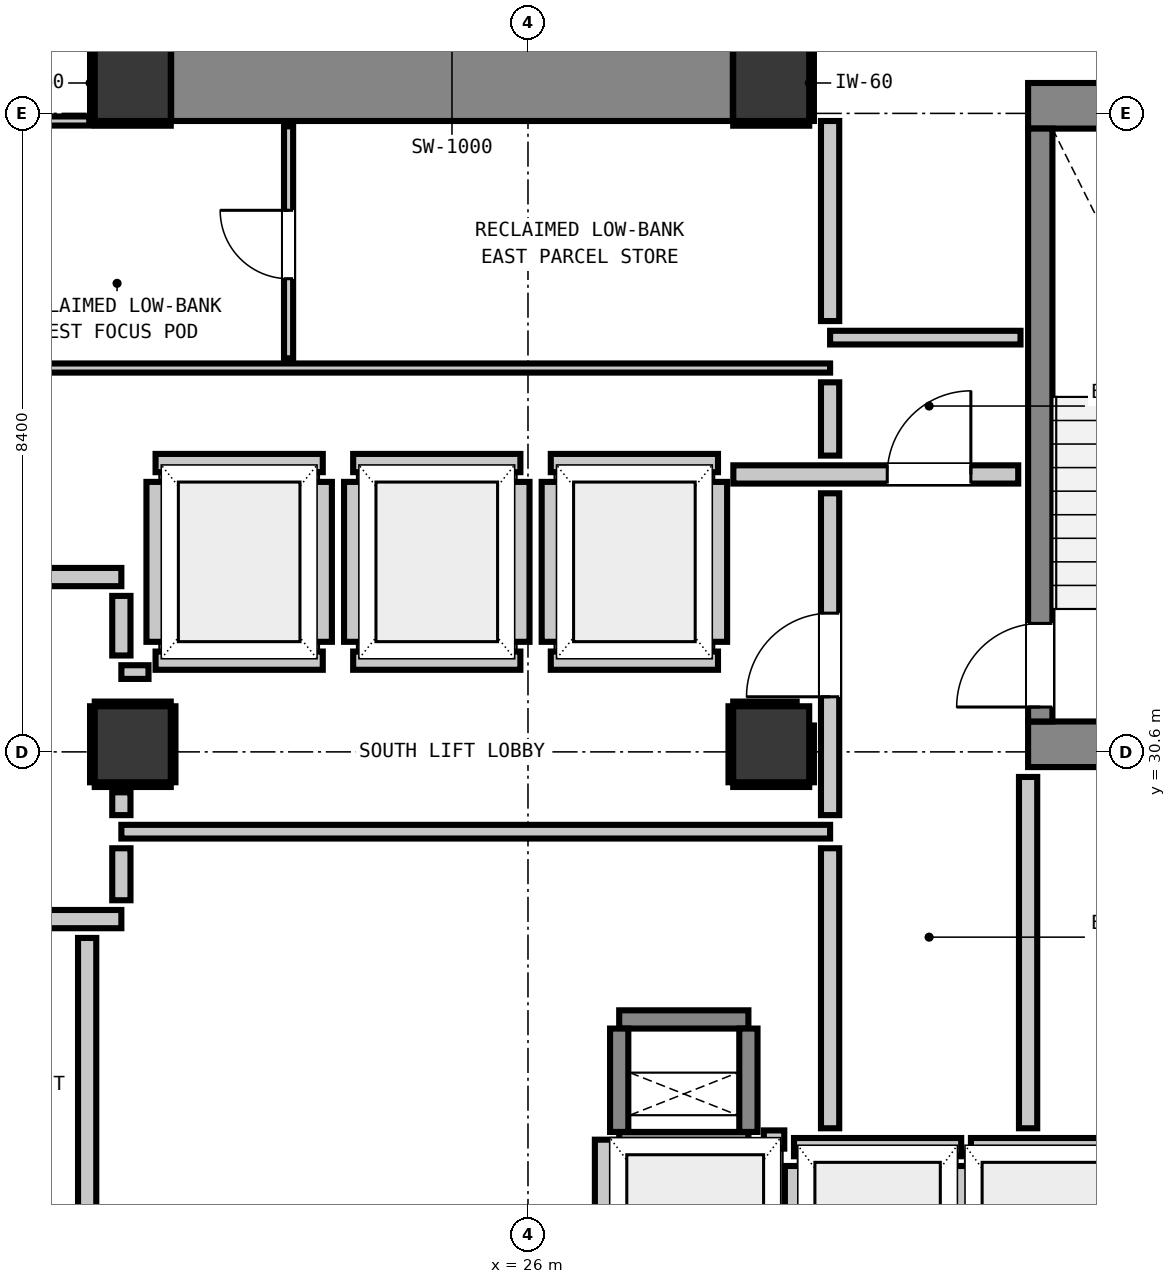
"""IFC4 building model, lengths in metres.
Left out: names, types, materials, properties, quantities, classifications, styles, units other than length and angle.
Written with IfcOpenShell. Run it as: python <this file> out.ifc"""

import sys

from ifc_helpers import new_model, si_unit, direction, frame, frame_2d, origin, origin_2d, place, context, subcontext, project, spatial, rectangle, extrude, element, fill, save


model = new_model("IFC4")
c1 = context("Model", 3, precision=1e-05, world=origin(), true_north=direction((0.0, 1.0)))
c2 = subcontext(c1, "Body", "Model", "MODEL_VIEW")
j1 = project(units=[si_unit("LENGTHUNIT", "METRE"), si_unit("PLANEANGLEUNIT", "RADIAN")], contexts=[c1])
p1 = place(None, origin())
s1 = spatial("IfcSite", under=j1, at=p1, CompositionType="ELEMENT")
p2 = place(p1, origin())
s2 = spatial("IfcBuilding", under=s1, at=p2, CompositionType="ELEMENT")
p3 = place(p2, frame((0.0, 0.0, 99.44)))
s3 = spatial("IfcBuildingStorey", under=s2, at=p3, CompositionType="ELEMENT", Elevation=99.44)
for number, where, z_axis, x_axis in (
    (1, (20.8, 39.4, 0.0), (0.0, 0.0, 1.0), (1.0, 0.0, 0.0)),
    (2, (29.2, 39.4, 0.0), (0.0, 0.0, 1.0), (1.0, 0.0, 0.0)),
):
    element("IfcColumn", number, at=place(p3, frame(where, z_axis=z_axis, x_axis=x_axis)), inside=s3, PredefinedType="COLUMN", context=c2, shape_type="SweptSolid", body=[
        extrude(rectangle(XDim=1.0, YDim=1.0, at=origin_2d()), origin(), (0.0, 0.0, 1.0), 3.32),
    ])
p4 = place(p3, frame((32.58, 39.1, 0.0), z_axis=(0.0, 0.0, 1.0), x_axis=(1.0, 0.0, 0.0)))
e3 = element("IfcWall", 3, at=p4, inside=s3, PredefinedType="SHEAR", context=c2, shape_type="SweptSolid", body=[
    extrude(rectangle(XDim=4.08, YDim=0.6, at=frame_2d((2.04, 0.0))), origin(), (0.0, 0.0, 1.0), 3.32),
])
p5 = place(p3, frame((32.58, 30.7, 0.0), z_axis=(0.0, 0.0, 1.0), x_axis=(1.0, 0.0, 0.0)))
e4 = element("IfcWall", 4, at=p5, inside=s3, PredefinedType="SHEAR", context=c2, shape_type="SweptSolid", body=[
    extrude(rectangle(XDim=3.415, YDim=0.6, at=frame_2d((1.708, 0.0))), origin(), (0.0, 0.0, 1.0), 3.32),
])
p6 = place(p3, frame((21.305, 39.4, 0.0), z_axis=(0.0, 0.0, 1.0), x_axis=(1.0, 0.0, 0.0)))
e5 = element("IfcWall", 5, at=p6, inside=s3, PredefinedType="SHEAR", context=c2, shape_type="SweptSolid", body=[
    extrude(rectangle(XDim=7.39, YDim=1.0, at=frame_2d((3.695, 0.0))), origin(), (0.0, 0.0, 1.0), 3.32),
])
p7 = place(p3, frame((32.74, 31.0, 0.0), z_axis=(0.0, 0.0, 1.0), x_axis=(0.0, 1.0, 0.0)))
e6 = element("IfcWall", 6, at=p7, inside=s3, PredefinedType="SHEAR", context=c2, shape_type="SweptSolid", body=[
    extrude(rectangle(XDim=7.8, YDim=0.32, at=frame_2d((3.9, 0.0))), origin(), (0.0, 0.0, 1.0), 3.32),
])
p8 = place(p7, frame((0.19, 0.0, 0.0)))
e7 = element("IfcOpeningElement", 7, at=p8, cuts=e6, PredefinedType="OPENING", context=c2, shape_type="SweptSolid", body=[
    extrude(rectangle(XDim=1.1, YDim=2.15, at=frame_2d((0.55, 1.075))), frame((0.0, 0.17, 0.0), z_axis=(0.0, -1.0, 0.0), x_axis=(1.0, 0.0, 0.0)), (0.0, 0.0, 1.0), 0.34),
])
for number, where, z_axis, x_axis in (
    (8, (27.2, 25.48, 0.0), (0.0, 0.0, 1.0), (1.0, 0.0, 0.0)),
    (9, (27.2, 27.08, 0.0), (0.0, 0.0, 1.0), (1.0, 0.0, 0.0)),
):
    element("IfcWall", number, at=place(p3, frame(where, z_axis=z_axis, x_axis=x_axis)), inside=s3, PredefinedType="SHEAR", context=c2, shape_type="SweptSolid", body=[
        extrude(rectangle(XDim=1.7, YDim=0.24, at=frame_2d((0.85, 0.0))), origin(), (0.0, 0.0, 1.0), 3.32),
    ])
for number, where, z_axis, x_axis in (
    (10, (27.2, 25.6, 0.0), (0.0, 0.0, 1.0), (0.0, 1.0, 0.0)),
    (11, (28.9, 25.6, 0.0), (0.0, 0.0, 1.0), (0.0, 1.0, 0.0)),
):
    element("IfcWall", number, at=place(p3, frame(where, z_axis=z_axis, x_axis=x_axis)), inside=s3, PredefinedType="SHEAR", context=c2, shape_type="SweptSolid", body=[
        extrude(rectangle(XDim=1.36, YDim=0.24, at=frame_2d((0.68, 0.0))), origin(), (0.0, 0.0, 1.0), 3.32),
    ])
for number, where, z_axis, x_axis in (
    (12, (20.8, 30.7, 0.0), (0.0, 0.0, 1.0), (1.0, 0.0, 0.0)),
    (13, (29.2, 30.7, 0.0), (0.0, 0.0, 1.0), (1.0, 0.0, 0.0)),
):
    element("IfcColumn", number, at=place(p3, frame(where, z_axis=z_axis, x_axis=x_axis)), inside=s3, PredefinedType="COLUMN", context=c2, shape_type="SweptSolid", body=[
        extrude(rectangle(XDim=1.0, YDim=1.0, at=origin_2d()), origin(), (0.0, 0.0, 1.0), 3.32),
    ])
for number, where, z_axis, x_axis in (
    (14, (21.1, 31.8, 0.0), (0.0, 0.0, 1.0), (1.0, 0.0, 0.0)),
    (15, (21.1, 34.4, 0.0), (0.0, 0.0, 1.0), (1.0, 0.0, 0.0)),
):
    element("IfcWall", number, at=place(p3, frame(where, z_axis=z_axis, x_axis=x_axis)), inside=s3, PredefinedType="PARTITIONING", context=c2, shape_type="SweptSolid", body=[
        extrude(rectangle(XDim=2.2, YDim=0.24, at=frame_2d((1.1, 0.0))), origin(), (0.0, 0.0, 1.0), 3.06),
    ])
p9 = place(p3, frame((21.1, 32.048, 0.0), z_axis=(0.0, 0.0, 1.0), x_axis=(0.0, 1.0, 0.0)))
e16 = element("IfcWall", 16, at=p9, inside=s3, PredefinedType="PARTITIONING", context=c2, shape_type="SweptSolid", body=[
    extrude(rectangle(XDim=2.104, YDim=0.24, at=frame_2d((1.052, 0.0))), origin(), (0.0, 0.0, 1.0), 2.295),
])
p10 = place(p3, frame((23.3, 32.048, 0.0), z_axis=(0.0, 0.0, 1.0), x_axis=(0.0, 1.0, 0.0)))
e17 = element("IfcWall", 17, at=p10, inside=s3, PredefinedType="PARTITIONING", context=c2, shape_type="SweptSolid", body=[
    extrude(rectangle(XDim=2.104, YDim=0.24, at=frame_2d((1.052, 0.0))), origin(), (0.0, 0.0, 1.0), 3.06),
])
for number, where, z_axis, x_axis in (
    (18, (23.7, 31.8, 0.0), (0.0, 0.0, 1.0), (1.0, 0.0, 0.0)),
    (19, (23.7, 34.4, 0.0), (0.0, 0.0, 1.0), (1.0, 0.0, 0.0)),
):
    element("IfcWall", number, at=place(p3, frame(where, z_axis=z_axis, x_axis=x_axis)), inside=s3, PredefinedType="PARTITIONING", context=c2, shape_type="SweptSolid", body=[
        extrude(rectangle(XDim=2.2, YDim=0.24, at=frame_2d((1.1, 0.0))), origin(), (0.0, 0.0, 1.0), 3.06),
    ])
for number, where, z_axis, x_axis in (
    (20, (23.7, 32.048, 0.0), (0.0, 0.0, 1.0), (0.0, 1.0, 0.0)),
    (21, (25.9, 32.048, 0.0), (0.0, 0.0, 1.0), (0.0, 1.0, 0.0)),
):
    element("IfcWall", number, at=place(p3, frame(where, z_axis=z_axis, x_axis=x_axis)), inside=s3, PredefinedType="PARTITIONING", context=c2, shape_type="SweptSolid", body=[
        extrude(rectangle(XDim=2.104, YDim=0.24, at=frame_2d((1.052, 0.0))), origin(), (0.0, 0.0, 1.0), 3.06),
    ])
for number, where, z_axis, x_axis in (
    (22, (26.3, 31.8, 0.0), (0.0, 0.0, 1.0), (1.0, 0.0, 0.0)),
    (23, (26.3, 34.4, 0.0), (0.0, 0.0, 1.0), (1.0, 0.0, 0.0)),
):
    element("IfcWall", number, at=place(p3, frame(where, z_axis=z_axis, x_axis=x_axis)), inside=s3, PredefinedType="PARTITIONING", context=c2, shape_type="SweptSolid", body=[
        extrude(rectangle(XDim=2.2, YDim=0.24, at=frame_2d((1.1, 0.0))), origin(), (0.0, 0.0, 1.0), 3.06),
    ])
for number, where, z_axis, x_axis in (
    (24, (26.3, 32.048, 0.0), (0.0, 0.0, 1.0), (0.0, 1.0, 0.0)),
    (25, (28.5, 32.048, 0.0), (0.0, 0.0, 1.0), (0.0, 1.0, 0.0)),
):
    element("IfcWall", number, at=place(p3, frame(where, z_axis=z_axis, x_axis=x_axis)), inside=s3, PredefinedType="PARTITIONING", context=c2, shape_type="SweptSolid", body=[
        extrude(rectangle(XDim=2.104, YDim=0.24, at=frame_2d((1.052, 0.0))), origin(), (0.0, 0.0, 1.0), 3.06),
    ])
p11 = place(p3, frame((29.5, 25.4, 0.0), z_axis=(0.0, 0.0, 1.0), x_axis=(1.0, 0.0, 0.0)))
e26 = element("IfcWall", 26, at=p11, inside=s3, PredefinedType="PARTITIONING", context=c2, shape_type="SweptSolid", body=[
    extrude(rectangle(XDim=2.2, YDim=0.24, at=frame_2d((1.1, 0.0))), origin(), (0.0, 0.0, 1.0), 3.06),
])
p12 = place(p3, frame((29.5, 22.632, 0.0), z_axis=(0.0, 0.0, 1.0), x_axis=(0.0, 1.0, 0.0)))
e27 = element("IfcWall", 27, at=p12, inside=s3, PredefinedType="PARTITIONING", context=c2, shape_type="SweptSolid", body=[
    extrude(rectangle(XDim=2.52, YDim=0.24, at=frame_2d((1.26, 0.0))), origin(), (0.0, 0.0, 1.0), 2.295),
])
p13 = place(p3, frame((31.7, 22.63, 0.0), z_axis=(0.0, 0.0, 1.0), x_axis=(0.0, 1.0, 0.0)))
e28 = element("IfcWall", 28, at=p13, inside=s3, PredefinedType="PARTITIONING", context=c2, shape_type="SweptSolid", body=[
    extrude(rectangle(XDim=2.522, YDim=0.24, at=frame_2d((1.261, 0.0))), origin(), (0.0, 0.0, 1.0), 3.06),
])
p14 = place(p3, frame((31.828, 25.4, 0.0), z_axis=(0.0, 0.0, 1.0), x_axis=(1.0, 0.0, 0.0)))
e29 = element("IfcWall", 29, at=p14, inside=s3, PredefinedType="PARTITIONING", context=c2, shape_type="SweptSolid", body=[
    extrude(rectangle(XDim=2.072, YDim=0.24, at=frame_2d((1.036, 0.0))), origin(), (0.0, 0.0, 1.0), 3.06),
])
p15 = place(p3, frame((29.103, 25.5, 0.0), z_axis=(0.0, 0.0, 1.0), x_axis=(1.0, 0.0, 0.0)))
e30 = element("IfcWall", 30, at=p15, inside=s3, PredefinedType="PARTITIONING", context=c2, shape_type="SweptSolid", body=[
    extrude(rectangle(XDim=0.269, YDim=0.24, at=frame_2d((0.135, 0.0))), origin(), (0.0, 0.0, 1.0), 3.06),
])
p16 = place(p3, frame((27.0, 22.63, 0.0), z_axis=(0.0, 0.0, 1.0), x_axis=(0.0, 1.0, 0.0)))
e31 = element("IfcWall", 31, at=p16, inside=s3, PredefinedType="PARTITIONING", context=c2, shape_type="SweptSolid", body=[
    extrude(rectangle(XDim=2.868, YDim=0.24, at=frame_2d((1.434, 0.0))), origin(), (0.0, 0.0, 1.0), 3.06),
])
p17 = place(p3, frame((17.45, 28.4, 0.0), z_axis=(0.0, 0.0, 1.0), x_axis=(1.0, 0.0, 0.0)))
e32 = element("IfcWall", 32, at=p17, inside=s3, PredefinedType="PARTITIONING", context=c2, shape_type="SweptSolid", body=[
    extrude(rectangle(XDim=3.2, YDim=0.24, at=frame_2d((1.6, 0.0))), origin(), (0.0, 0.0, 1.0), 3.06),
])
p18 = place(p17, frame((0.784, 0.0, 0.0)))
e33 = element("IfcOpeningElement", 33, at=p18, cuts=e32, PredefinedType="OPENING", context=c2, shape_type="SweptSolid", body=[
    extrude(rectangle(XDim=1.1, YDim=2.15, at=frame_2d((0.55, 1.075))), frame((0.0, 0.13, 0.0), z_axis=(0.0, -1.0, 0.0), x_axis=(1.0, 0.0, 0.0)), (0.0, 0.0, 1.0), 0.26),
])
p19 = place(p3, frame((17.45, 32.9, 0.0), z_axis=(0.0, 0.0, 1.0), x_axis=(1.0, 0.0, 0.0)))
e34 = element("IfcWall", 34, at=p19, inside=s3, PredefinedType="PARTITIONING", context=c2, shape_type="SweptSolid", body=[
    extrude(rectangle(XDim=3.2, YDim=0.24, at=frame_2d((1.6, 0.0))), origin(), (0.0, 0.0, 1.0), 3.06),
])
p20 = place(p19, frame((0.159, 0.0, 0.0)))
e35 = element("IfcOpeningElement", 35, at=p20, cuts=e34, PredefinedType="OPENING", context=c2, shape_type="SweptSolid", body=[
    extrude(rectangle(XDim=1.1, YDim=2.15, at=frame_2d((0.55, 1.075))), frame((0.0, 0.13, 0.0), z_axis=(0.0, -1.0, 0.0), x_axis=(1.0, 0.0, 0.0)), (0.0, 0.0, 1.0), 0.26),
])
p21 = place(p3, frame((28.702, 34.25, 0.0), z_axis=(0.0, 0.0, 1.0), x_axis=(1.0, 0.0, 0.0)))
e36 = element("IfcWall", 36, at=p21, inside=s3, PredefinedType="PARTITIONING", context=c2, shape_type="SweptSolid", body=[
    extrude(rectangle(XDim=3.748, YDim=0.24, at=frame_2d((1.874, 0.0))), origin(), (0.0, 0.0, 1.0), 3.06),
])
p22 = place(p21, frame((2.025, 0.0, 0.0)))
e37 = element("IfcOpeningElement", 37, at=p22, cuts=e36, PredefinedType="OPENING", context=c2, shape_type="SweptSolid", body=[
    extrude(rectangle(XDim=1.1, YDim=2.15, at=frame_2d((0.55, 1.075))), frame((0.0, 0.13, 0.0), z_axis=(0.0, -1.0, 0.0), x_axis=(1.0, 0.0, 0.0)), (0.0, 0.0, 1.0), 0.26),
])
p23 = place(p3, frame((20.65, 29.55, 0.0), z_axis=(0.0, 0.0, 1.0), x_axis=(1.0, 0.0, 0.0)))
e38 = element("IfcWall", 38, at=p23, inside=s3, PredefinedType="PARTITIONING", context=c2, shape_type="SweptSolid", body=[
    extrude(rectangle(XDim=9.325, YDim=0.18, at=frame_2d((4.663, 0.0))), origin(), (0.0, 0.0, 1.0), 3.06),
])
p24 = place(p3, frame((20.65, 31.65, 0.0), z_axis=(0.0, 0.0, 1.0), x_axis=(1.0, 0.0, 0.0)))
e39 = element("IfcWall", 39, at=p24, inside=s3, PredefinedType="PARTITIONING", context=c2, shape_type="SweptSolid", body=[
    extrude(rectangle(XDim=0.357, YDim=0.18, at=frame_2d((0.179, 0.0))), origin(), (0.0, 0.0, 1.0), 3.06),
])
p25 = place(p3, frame((29.975, 36.05, 0.0), z_axis=(0.0, 0.0, 1.0), x_axis=(1.0, 0.0, 0.0)))
e40 = element("IfcWall", 40, at=p25, inside=s3, PredefinedType="PARTITIONING", context=c2, shape_type="SweptSolid", body=[
    extrude(rectangle(XDim=2.505, YDim=0.18, at=frame_2d((1.252, 0.0))), origin(), (0.0, 0.0, 1.0), 3.06),
])
p26 = place(p3, frame((18.95, 35.65, 0.0), z_axis=(0.0, 0.0, 1.0), x_axis=(1.0, 0.0, 0.0)))
e41 = element("IfcWall", 41, at=p26, inside=s3, PredefinedType="PARTITIONING", context=c2, shape_type="SweptSolid", body=[
    extrude(rectangle(XDim=11.025, YDim=0.12, at=frame_2d((5.513, 0.0))), origin(), (0.0, 0.0, 1.0), 3.06),
])
p27 = place(p3, frame((18.95, 38.9, 0.0), z_axis=(0.0, 0.0, 1.0), x_axis=(1.0, 0.0, 0.0)))
e42 = element("IfcWall", 42, at=p27, inside=s3, PredefinedType="PARTITIONING", context=c2, shape_type="SweptSolid", body=[
    extrude(rectangle(XDim=1.278, YDim=0.12, at=frame_2d((0.639, 0.0))), origin(), (0.0, 0.0, 1.0), 3.06),
])
p28 = place(p3, frame((20.2, 22.586, 0.0), z_axis=(0.0, 0.0, 1.0), x_axis=(0.0, 1.0, 0.0)))
e43 = element("IfcWall", 43, at=p28, inside=s3, PredefinedType="PARTITIONING", context=c2, shape_type="SweptSolid", body=[
    extrude(rectangle(XDim=5.566, YDim=0.24, at=frame_2d((2.783, 0.0))), origin(), (0.0, 0.0, 1.0), 3.06),
])
p29 = place(p3, frame((20.65, 28.648, 0.0), z_axis=(0.0, 0.0, 1.0), x_axis=(0.0, 1.0, 0.0)))
e44 = element("IfcWall", 44, at=p29, inside=s3, PredefinedType="PARTITIONING", context=c2, shape_type="SweptSolid", body=[
    extrude(rectangle(XDim=0.684, YDim=0.24, at=frame_2d((0.342, 0.0))), origin(), (0.0, 0.0, 1.0), 2.295),
])
p30 = place(p3, frame((20.65, 29.768, 0.0), z_axis=(0.0, 0.0, 1.0), x_axis=(0.0, 1.0, 0.0)))
e45 = element("IfcWall", 45, at=p30, inside=s3, PredefinedType="PARTITIONING", context=c2, shape_type="SweptSolid", body=[
    extrude(rectangle(XDim=0.3, YDim=0.24, at=frame_2d((0.15, 0.0))), origin(), (0.0, 0.0, 1.0), 2.295),
])
p31 = place(p3, frame((20.65, 31.868, 0.0), z_axis=(0.0, 0.0, 1.0), x_axis=(0.0, 1.0, 0.0)))
e46 = element("IfcWall", 46, at=p31, inside=s3, PredefinedType="PARTITIONING", context=c2, shape_type="SweptSolid", body=[
    extrude(rectangle(XDim=0.784, YDim=0.24, at=frame_2d((0.392, 0.0))), origin(), (0.0, 0.0, 1.0), 2.295),
])
p32 = place(p3, frame((29.975, 25.648, 0.0), z_axis=(0.0, 0.0, 1.0), x_axis=(0.0, 1.0, 0.0)))
e47 = element("IfcWall", 47, at=p32, inside=s3, PredefinedType="PARTITIONING", context=c2, shape_type="SweptSolid", body=[
    extrude(rectangle(XDim=3.684, YDim=0.24, at=frame_2d((1.842, 0.0))), origin(), (0.0, 0.0, 1.0), 3.06),
])
p33 = place(p3, frame((29.975, 29.768, 0.0), z_axis=(0.0, 0.0, 1.0), x_axis=(0.0, 1.0, 0.0)))
e48 = element("IfcWall", 48, at=p33, inside=s3, PredefinedType="PARTITIONING", context=c2, shape_type="SweptSolid", body=[
    extrude(rectangle(XDim=4.234, YDim=0.24, at=frame_2d((2.117, 0.0))), origin(), (0.0, 0.0, 1.0), 3.06),
])
p34 = place(p33, frame((1.557, 0.0, 0.0)))
e49 = element("IfcOpeningElement", 49, at=p34, cuts=e48, PredefinedType="OPENING", context=c2, shape_type="SweptSolid", body=[
    extrude(rectangle(XDim=1.1, YDim=2.15, at=frame_2d((0.55, 1.075))), frame((0.0, 0.13, 0.0), z_axis=(0.0, -1.0, 0.0), x_axis=(1.0, 0.0, 0.0)), (0.0, 0.0, 1.0), 0.26),
])
p35 = place(p3, frame((29.975, 34.498, 0.0), z_axis=(0.0, 0.0, 1.0), x_axis=(0.0, 1.0, 0.0)))
e50 = element("IfcWall", 50, at=p35, inside=s3, PredefinedType="PARTITIONING", context=c2, shape_type="SweptSolid", body=[
    extrude(rectangle(XDim=0.964, YDim=0.24, at=frame_2d((0.482, 0.0))), origin(), (0.0, 0.0, 1.0), 3.06),
])
p36 = place(p3, frame((29.975, 36.268, 0.0), z_axis=(0.0, 0.0, 1.0), x_axis=(0.0, 1.0, 0.0)))
e51 = element("IfcWall", 51, at=p36, inside=s3, PredefinedType="PARTITIONING", context=c2, shape_type="SweptSolid", body=[
    extrude(rectangle(XDim=2.632, YDim=0.24, at=frame_2d((1.316, 0.0))), origin(), (0.0, 0.0, 1.0), 3.06),
])
p37 = place(p3, frame((32.58, 25.648, 0.0), z_axis=(0.0, 0.0, 1.0), x_axis=(0.0, 1.0, 0.0)))
e52 = element("IfcWall", 52, at=p37, inside=s3, PredefinedType="PARTITIONING", context=c2, shape_type="SweptSolid", body=[
    extrude(rectangle(XDim=4.622, YDim=0.24, at=frame_2d((2.311, 0.0))), origin(), (0.0, 0.0, 1.0), 3.06),
])
p38 = place(p3, frame((22.85, 35.778, 0.0), z_axis=(0.0, 0.0, 1.0), x_axis=(0.0, 1.0, 0.0)))
e53 = element("IfcWall", 53, at=p38, inside=s3, PredefinedType="PARTITIONING", context=c2, shape_type="SweptSolid", body=[
    extrude(rectangle(XDim=3.052, YDim=0.12, at=frame_2d((1.526, 0.0))), origin(), (0.0, 0.0, 1.0), 3.06),
])
p39 = place(p38, frame((1.047, 0.0, 0.0)))
e54 = element("IfcOpeningElement", 54, at=p39, cuts=e53, PredefinedType="OPENING", context=c2, shape_type="SweptSolid", body=[
    extrude(rectangle(XDim=0.9, YDim=2.1, at=frame_2d((0.45, 1.05))), frame((0.0, 0.07, 0.0), z_axis=(0.0, -1.0, 0.0), x_axis=(1.0, 0.0, 0.0)), (0.0, 0.0, 1.0), 0.14),
])
for number, where, z_axis, x_axis in (
    (55, (20.3, 38.868, 0.0), (0.0, 0.0, 1.0), (1.0, 0.0, 0.0)),
    (56, (20.268, 38.9, 0.0), (0.0, 0.0, 1.0), (0.0, 1.0, 0.0)),
    (57, (28.7, 38.868, 0.0), (0.0, 0.0, 1.0), (1.0, 0.0, 0.0)),
    (58, (29.732, 38.9, 0.0), (0.0, 0.0, 1.0), (0.0, 1.0, 0.0)),
    (59, (20.3, 30.168, 0.0), (0.0, 0.0, 1.0), (1.0, 0.0, 0.0)),
    (60, (20.3, 31.232, 0.0), (0.0, 0.0, 1.0), (1.0, 0.0, 0.0)),
    (61, (20.268, 30.2, 0.0), (0.0, 0.0, 1.0), (0.0, 1.0, 0.0)),
    (62, (21.332, 30.2, 0.0), (0.0, 0.0, 1.0), (0.0, 1.0, 0.0)),
    (63, (28.7, 30.168, 0.0), (0.0, 0.0, 1.0), (1.0, 0.0, 0.0)),
):
    element("IfcWall", number, at=place(p3, frame(where, z_axis=z_axis, x_axis=x_axis)), inside=s3, PredefinedType="PARTITIONING", context=c2, shape_type="SweptSolid", body=[
        extrude(rectangle(XDim=1.0, YDim=0.06, at=frame_2d((0.5, 0.0))), origin(), (0.0, 0.0, 1.0), 1.45),
    ])
p40 = place(p3, frame((28.7, 31.232, 0.0), z_axis=(0.0, 0.0, 1.0), x_axis=(1.0, 0.0, 0.0)))
e64 = element("IfcWall", 64, at=p40, inside=s3, PredefinedType="PARTITIONING", context=c2, shape_type="SweptSolid", body=[
    extrude(rectangle(XDim=0.835, YDim=0.06, at=frame_2d((0.417, 0.0))), origin(), (0.0, 0.0, 1.0), 1.45),
])
p41 = place(p3, frame((28.668, 30.2, 0.0), z_axis=(0.0, 0.0, 1.0), x_axis=(0.0, 1.0, 0.0)))
e65 = element("IfcWall", 65, at=p41, inside=s3, PredefinedType="PARTITIONING", context=c2, shape_type="SweptSolid", body=[
    extrude(rectangle(XDim=1.0, YDim=0.06, at=frame_2d((0.5, 0.0))), origin(), (0.0, 0.0, 1.0), 1.45),
])
p42 = place(p3, frame((29.732, 30.2, 0.0), z_axis=(0.0, 0.0, 1.0), x_axis=(0.0, 1.0, 0.0)))
e66 = element("IfcWall", 66, at=p42, inside=s3, PredefinedType="PARTITIONING", context=c2, shape_type="SweptSolid", body=[
    extrude(rectangle(XDim=0.747, YDim=0.06, at=frame_2d((0.374, 0.0))), origin(), (0.0, 0.0, 1.0), 1.45),
])
p43 = place(p8, origin())
e67 = element("IfcDoor", 67, at=p43, inside=s3, OperationType="SINGLE_SWING_LEFT", PredefinedType="DOOR", context=c2, shape_type="SweptSolid", body=[
    extrude(rectangle(XDim=1.1, YDim=2.15, at=frame_2d((0.55, 1.075))), frame((0.0, 0.025, 0.0), z_axis=(0.0, -1.0, 0.0), x_axis=(1.0, 0.0, 0.0)), (0.0, 0.0, 1.0), 0.05),
])
fill(e7, e67)
p44 = place(p34, origin())
e68 = element("IfcDoor", 68, at=p44, inside=s3, OperationType="SINGLE_SWING_LEFT", PredefinedType="DOOR", context=c2, shape_type="SweptSolid", body=[
    extrude(rectangle(XDim=1.1, YDim=2.15, at=frame_2d((0.55, 1.075))), frame((0.0, 0.025, 0.0), z_axis=(0.0, -1.0, 0.0), x_axis=(1.0, 0.0, 0.0)), (0.0, 0.0, 1.0), 0.05),
])
fill(e49, e68)
p45 = place(p22, origin())
e69 = element("IfcDoor", 69, at=p45, inside=s3, OperationType="SINGLE_SWING_RIGHT", PredefinedType="DOOR", context=c2, shape_type="SweptSolid", body=[
    extrude(rectangle(XDim=1.1, YDim=2.15, at=frame_2d((0.55, 1.075))), frame((0.0, 0.025, 0.0), z_axis=(0.0, -1.0, 0.0), x_axis=(1.0, 0.0, 0.0)), (0.0, 0.0, 1.0), 0.05),
])
fill(e37, e69)
p46 = place(p39, origin())
e70 = element("IfcDoor", 70, at=p46, inside=s3, OperationType="SINGLE_SWING_RIGHT", PredefinedType="DOOR", context=c2, shape_type="SweptSolid", body=[
    extrude(rectangle(XDim=0.9, YDim=2.1, at=frame_2d((0.45, 1.05))), frame((0.0, 0.025, 0.0), z_axis=(0.0, -1.0, 0.0), x_axis=(1.0, 0.0, 0.0)), (0.0, 0.0, 1.0), 0.05),
])
fill(e54, e70)
save(model, sys.argv[1])
